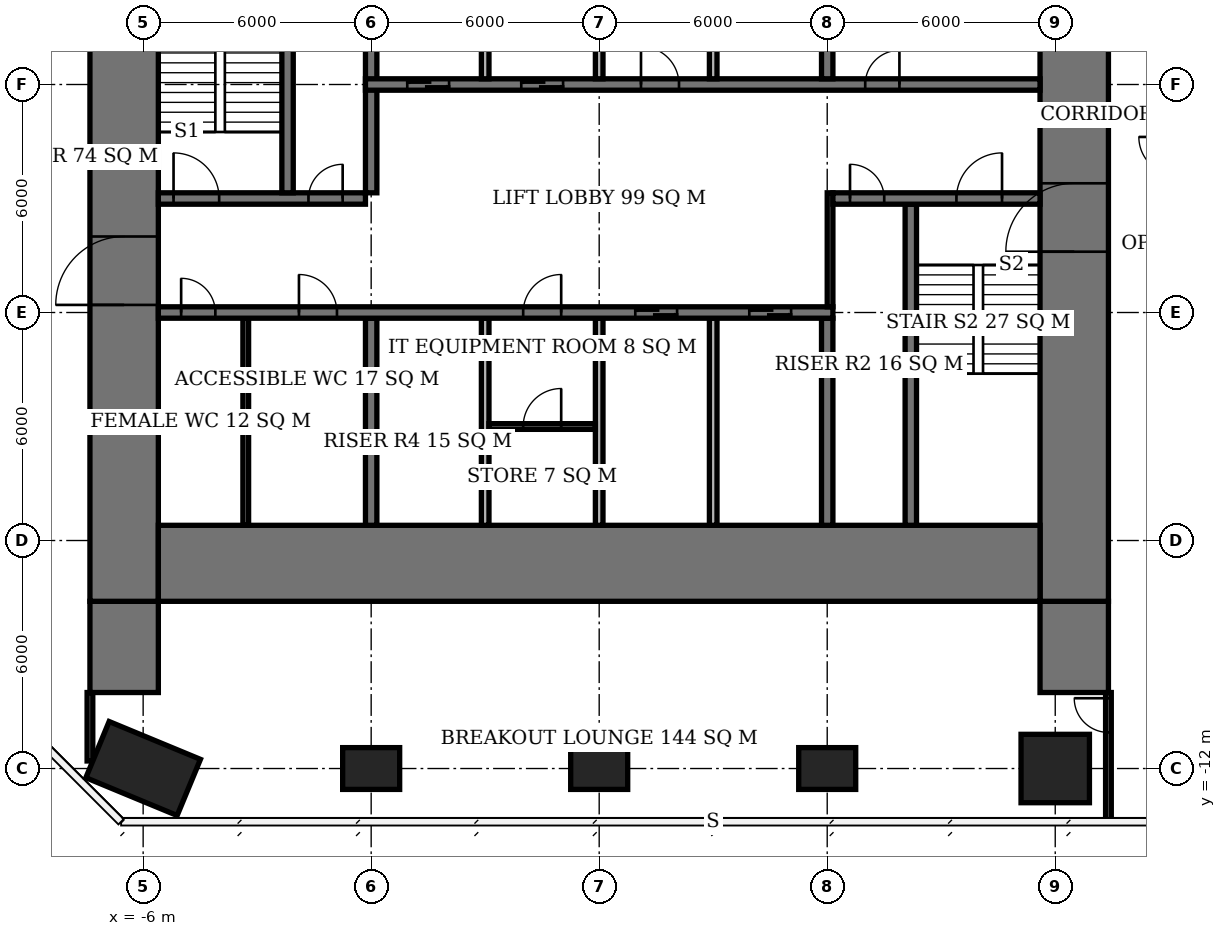
"""IFC4 building model, lengths in metres.
Left out: names, types, materials, properties, quantities, classifications, styles, units other than length and angle.
Written with IfcOpenShell. Run it as: python <this file> out.ifc"""

import sys

from ifc_helpers import new_model, si_unit, direction, frame, frame_2d, origin, origin_2d, place, context, subcontext, project, spatial, rectangle, extrude, element, fill, save


model = new_model("IFC4")
c1 = context("Model", 3, precision=1e-05, world=origin(), true_north=direction((0.0, 1.0)))
c2 = subcontext(c1, "Body", "Model", "MODEL_VIEW")
j1 = project(units=[si_unit("LENGTHUNIT", "METRE"), si_unit("PLANEANGLEUNIT", "RADIAN")], contexts=[c1])
p1 = place(None, origin())
s1 = spatial("IfcSite", under=j1, at=p1, CompositionType="ELEMENT")
p2 = place(p1, origin())
s2 = spatial("IfcBuilding", under=s1, at=p2, CompositionType="ELEMENT")
p3 = place(p2, frame((0.0, 0.0, 173.3)))
s3 = spatial("IfcBuildingStorey", under=s2, at=p3, CompositionType="ELEMENT", Elevation=173.3)
p4 = place(p3, frame((-6.0, -12.0, 0.0), z_axis=(0.0, 0.0, 1.0), x_axis=(-0.923879532511, 0.382683432365, 0.0)))
e1 = element("IfcColumn", 1, at=p4, inside=s3, PredefinedType="COLUMN", context=c2, shape_type="SweptSolid", body=[
    extrude(rectangle(XDim=2.6, YDim=1.6, at=origin_2d()), origin(), (0.0, 0.0, 1.0), 3.9),
])
for number, where, z_axis, x_axis in (
    (2, (0.0, -12.0, 0.0), (0.0, 0.0, 1.0), (1.0, 0.0, 0.0)),
    (3, (6.0, -12.0, 0.0), (0.0, 0.0, 1.0), (1.0, 0.0, 0.0)),
    (4, (12.0, -12.0, 0.0), (0.0, 0.0, 1.0), (1.0, 0.0, 0.0)),
):
    element("IfcColumn", number, at=place(p3, frame(where, z_axis=z_axis, x_axis=x_axis)), inside=s3, PredefinedType="COLUMN", context=c2, shape_type="SweptSolid", body=[
        extrude(rectangle(XDim=1.5, YDim=1.1, at=origin_2d()), origin(), (0.0, 0.0, 1.0), 3.9),
    ])
p5 = place(p3, frame((18.0, -12.0, 0.0), z_axis=(0.0, 0.0, 1.0), x_axis=(1.0, 0.0, 0.0)))
e5 = element("IfcColumn", 5, at=p5, inside=s3, PredefinedType="COLUMN", context=c2, shape_type="SweptSolid", body=[
    extrude(rectangle(XDim=1.8, YDim=1.8, at=origin_2d()), origin(), (0.0, 0.0, 1.0), 3.9),
])
p6 = place(p3, frame((-5.6, -6.6, 0.0), z_axis=(0.0, 0.0, 1.0), x_axis=(1.0, 0.0, 0.0)))
e6 = element("IfcWall", 6, at=p6, inside=s3, PredefinedType="SHEAR", context=c2, shape_type="SweptSolid", body=[
    extrude(rectangle(XDim=23.2, YDim=2.0, at=frame_2d((11.6, 0.0))), origin(), (0.0, 0.0, 1.0), 3.9),
])
p7 = place(p3, frame((-6.5, -7.6, 0.0), z_axis=(0.0, 0.0, 1.0), x_axis=(0.0, 1.0, 0.0)))
e7 = element("IfcWall", 7, at=p7, inside=s3, PredefinedType="SHEAR", context=c2, shape_type="SweptSolid", body=[
    extrude(rectangle(XDim=21.2, YDim=1.8, at=frame_2d((10.6, 0.0))), origin(), (0.0, 0.0, 1.0), 3.9),
])
p8 = place(p7, frame((7.8, 0.0, 0.0)))
e8 = element("IfcOpeningElement", 8, at=p8, cuts=e7, PredefinedType="OPENING", context=c2, shape_type="SweptSolid", body=[
    extrude(rectangle(XDim=1.8, YDim=2.4, at=frame_2d((0.9, 1.2))), frame((0.0, 0.91, 0.0), z_axis=(0.0, -1.0, 0.0), x_axis=(1.0, 0.0, 0.0)), (0.0, 0.0, 1.0), 1.82),
])
p9 = place(p3, frame((18.5, -7.6, 0.0), z_axis=(0.0, 0.0, 1.0), x_axis=(0.0, 1.0, 0.0)))
e9 = element("IfcWall", 9, at=p9, inside=s3, PredefinedType="SHEAR", context=c2, shape_type="SweptSolid", body=[
    extrude(rectangle(XDim=21.2, YDim=1.8, at=frame_2d((10.6, 0.0))), origin(), (0.0, 0.0, 1.0), 3.9),
])
p10 = place(p9, frame((9.2, 0.0, 0.0)))
e10 = element("IfcOpeningElement", 10, at=p10, cuts=e9, PredefinedType="OPENING", context=c2, shape_type="SweptSolid", body=[
    extrude(rectangle(XDim=1.8, YDim=2.4, at=frame_2d((0.9, 1.2))), frame((0.0, 0.91, 0.0), z_axis=(0.0, -1.0, 0.0), x_axis=(1.0, 0.0, 0.0)), (0.0, 0.0, 1.0), 1.82),
])
for number, where, z_axis, x_axis in (
    (11, (-6.5, -10.0, 0.0), (0.0, 0.0, 1.0), (0.0, 1.0, 0.0)),
    (12, (18.5, -10.0, 0.0), (0.0, 0.0, 1.0), (0.0, 1.0, 0.0)),
):
    element("IfcWall", number, at=place(p3, frame(where, z_axis=z_axis, x_axis=x_axis)), inside=s3, PredefinedType="SHEAR", context=c2, shape_type="SweptSolid", body=[
        extrude(rectangle(XDim=2.4, YDim=1.8, at=frame_2d((1.2, 0.0))), origin(), (0.0, 0.0, 1.0), 3.9),
    ])
p11 = place(p3, frame((-5.6, 0.0, 0.0), z_axis=(0.0, 0.0, 1.0), x_axis=(1.0, 0.0, 0.0)))
e13 = element("IfcWall", 13, at=p11, inside=s3, PredefinedType="SHEAR", context=c2, shape_type="SweptSolid", body=[
    extrude(rectangle(XDim=17.75, YDim=0.3, at=frame_2d((8.875, 0.0))), origin(), (0.0, 0.0, 1.0), 3.9),
])
p12 = place(p11, frame((0.6, 0.0, 0.0)))
e14 = element("IfcOpeningElement", 14, at=p12, cuts=e13, PredefinedType="OPENING", context=c2, shape_type="SweptSolid", body=[
    extrude(rectangle(XDim=0.9, YDim=2.1, at=frame_2d((0.45, 1.05))), frame((0.0, 0.16, 0.0), z_axis=(0.0, -1.0, 0.0), x_axis=(1.0, 0.0, 0.0)), (0.0, 0.0, 1.0), 0.32),
])
p13 = place(p11, frame((3.7, 0.0, 0.0)))
e15 = element("IfcOpeningElement", 15, at=p13, cuts=e13, PredefinedType="OPENING", context=c2, shape_type="SweptSolid", body=[
    extrude(rectangle(XDim=1.0, YDim=2.1, at=frame_2d((0.5, 1.05))), frame((0.0, 0.16, 0.0), z_axis=(0.0, -1.0, 0.0), x_axis=(1.0, 0.0, 0.0)), (0.0, 0.0, 1.0), 0.32),
])
p14 = place(p11, frame((9.6, 0.0, 0.0)))
e16 = element("IfcOpeningElement", 16, at=p14, cuts=e13, PredefinedType="OPENING", context=c2, shape_type="SweptSolid", body=[
    extrude(rectangle(XDim=1.0, YDim=2.1, at=frame_2d((0.5, 1.05))), frame((0.0, 0.16, 0.0), z_axis=(0.0, -1.0, 0.0), x_axis=(1.0, 0.0, 0.0)), (0.0, 0.0, 1.0), 0.32),
])
p15 = place(p11, frame((12.55, 0.0, 0.0)))
e17 = element("IfcOpeningElement", 17, at=p15, cuts=e13, PredefinedType="OPENING", context=c2, shape_type="SweptSolid", body=[
    extrude(rectangle(XDim=1.1, YDim=2.1, at=frame_2d((0.55, 1.05))), frame((0.0, 0.16, 0.0), z_axis=(0.0, -1.0, 0.0), x_axis=(1.0, 0.0, 0.0)), (0.0, 0.0, 1.0), 0.32),
])
p16 = place(p11, frame((15.55, 0.0, 0.0)))
e18 = element("IfcOpeningElement", 18, at=p16, cuts=e13, PredefinedType="OPENING", context=c2, shape_type="SweptSolid", body=[
    extrude(rectangle(XDim=1.1, YDim=2.1, at=frame_2d((0.55, 1.05))), frame((0.0, 0.16, 0.0), z_axis=(0.0, -1.0, 0.0), x_axis=(1.0, 0.0, 0.0)), (0.0, 0.0, 1.0), 0.32),
])
p17 = place(p3, frame((-5.6, 3.0, 0.0), z_axis=(0.0, 0.0, 1.0), x_axis=(1.0, 0.0, 0.0)))
e19 = element("IfcWall", 19, at=p17, inside=s3, PredefinedType="SHEAR", context=c2, shape_type="SweptSolid", body=[
    extrude(rectangle(XDim=5.45, YDim=0.3, at=frame_2d((2.725, 0.0))), origin(), (0.0, 0.0, 1.0), 3.9),
])
p18 = place(p17, frame((0.4, 0.0, 0.0)))
e20 = element("IfcOpeningElement", 20, at=p18, cuts=e19, PredefinedType="OPENING", context=c2, shape_type="SweptSolid", body=[
    extrude(rectangle(XDim=1.2, YDim=2.1, at=frame_2d((0.6, 1.05))), frame((0.0, 0.16, 0.0), z_axis=(0.0, -1.0, 0.0), x_axis=(1.0, 0.0, 0.0)), (0.0, 0.0, 1.0), 0.32),
])
p19 = place(p17, frame((3.95, 0.0, 0.0)))
e21 = element("IfcOpeningElement", 21, at=p19, cuts=e19, PredefinedType="OPENING", context=c2, shape_type="SweptSolid", body=[
    extrude(rectangle(XDim=0.9, YDim=2.1, at=frame_2d((0.45, 1.05))), frame((0.0, 0.16, 0.0), z_axis=(0.0, -1.0, 0.0), x_axis=(1.0, 0.0, 0.0)), (0.0, 0.0, 1.0), 0.32),
])
p20 = place(p3, frame((12.15, 3.0, 0.0), z_axis=(0.0, 0.0, 1.0), x_axis=(1.0, 0.0, 0.0)))
e22 = element("IfcWall", 22, at=p20, inside=s3, PredefinedType="SHEAR", context=c2, shape_type="SweptSolid", body=[
    extrude(rectangle(XDim=5.45, YDim=0.3, at=frame_2d((2.725, 0.0))), origin(), (0.0, 0.0, 1.0), 3.9),
])
p21 = place(p20, frame((3.25, 0.0, 0.0)))
e23 = element("IfcOpeningElement", 23, at=p21, cuts=e22, PredefinedType="OPENING", context=c2, shape_type="SweptSolid", body=[
    extrude(rectangle(XDim=1.2, YDim=2.1, at=frame_2d((0.6, 1.05))), frame((0.0, 0.16, 0.0), z_axis=(0.0, -1.0, 0.0), x_axis=(1.0, 0.0, 0.0)), (0.0, 0.0, 1.0), 0.32),
])
p22 = place(p20, frame((0.45, 0.0, 0.0)))
e24 = element("IfcOpeningElement", 24, at=p22, cuts=e22, PredefinedType="OPENING", context=c2, shape_type="SweptSolid", body=[
    extrude(rectangle(XDim=0.9, YDim=2.1, at=frame_2d((0.45, 1.05))), frame((0.0, 0.16, 0.0), z_axis=(0.0, -1.0, 0.0), x_axis=(1.0, 0.0, 0.0)), (0.0, 0.0, 1.0), 0.32),
])
p23 = place(p3, frame((-0.15, 6.0, 0.0), z_axis=(0.0, 0.0, 1.0), x_axis=(1.0, 0.0, 0.0)))
e25 = element("IfcWall", 25, at=p23, inside=s3, PredefinedType="SHEAR", context=c2, shape_type="SweptSolid", body=[
    extrude(rectangle(XDim=17.75, YDim=0.3, at=frame_2d((8.875, 0.0))), origin(), (0.0, 0.0, 1.0), 3.9),
])
p24 = place(p23, frame((13.15, 0.0, 0.0)))
e26 = element("IfcOpeningElement", 26, at=p24, cuts=e25, PredefinedType="OPENING", context=c2, shape_type="SweptSolid", body=[
    extrude(rectangle(XDim=0.9, YDim=2.1, at=frame_2d((0.45, 1.05))), frame((0.0, 0.16, 0.0), z_axis=(0.0, -1.0, 0.0), x_axis=(1.0, 0.0, 0.0)), (0.0, 0.0, 1.0), 0.32),
])
p25 = place(p23, frame((7.25, 0.0, 0.0)))
e27 = element("IfcOpeningElement", 27, at=p25, cuts=e25, PredefinedType="OPENING", context=c2, shape_type="SweptSolid", body=[
    extrude(rectangle(XDim=1.0, YDim=2.1, at=frame_2d((0.5, 1.05))), frame((0.0, 0.16, 0.0), z_axis=(0.0, -1.0, 0.0), x_axis=(1.0, 0.0, 0.0)), (0.0, 0.0, 1.0), 0.32),
])
p26 = place(p23, frame((1.1, 0.0, 0.0)))
e28 = element("IfcOpeningElement", 28, at=p26, cuts=e25, PredefinedType="OPENING", context=c2, shape_type="SweptSolid", body=[
    extrude(rectangle(XDim=1.1, YDim=2.1, at=frame_2d((0.55, 1.05))), frame((0.0, 0.16, 0.0), z_axis=(0.0, -1.0, 0.0), x_axis=(1.0, 0.0, 0.0)), (0.0, 0.0, 1.0), 0.32),
])
p27 = place(p23, frame((4.1, 0.0, 0.0)))
e29 = element("IfcOpeningElement", 29, at=p27, cuts=e25, PredefinedType="OPENING", context=c2, shape_type="SweptSolid", body=[
    extrude(rectangle(XDim=1.1, YDim=2.1, at=frame_2d((0.55, 1.05))), frame((0.0, 0.16, 0.0), z_axis=(0.0, -1.0, 0.0), x_axis=(1.0, 0.0, 0.0)), (0.0, 0.0, 1.0), 0.32),
])
p28 = place(p3, frame((0.0, -5.6, 0.0), z_axis=(0.0, 0.0, 1.0), x_axis=(0.0, 1.0, 0.0)))
e30 = element("IfcWall", 30, at=p28, inside=s3, PredefinedType="SHEAR", context=c2, shape_type="SweptSolid", body=[
    extrude(rectangle(XDim=5.45, YDim=0.3, at=frame_2d((2.725, 0.0))), origin(), (0.0, 0.0, 1.0), 3.9),
])
p29 = place(p3, frame((0.0, 3.15, 0.0), z_axis=(0.0, 0.0, 1.0), x_axis=(0.0, 1.0, 0.0)))
e31 = element("IfcWall", 31, at=p29, inside=s3, PredefinedType="SHEAR", context=c2, shape_type="SweptSolid", body=[
    extrude(rectangle(XDim=8.45, YDim=0.3, at=frame_2d((4.225, 0.0))), origin(), (0.0, 0.0, 1.0), 3.9),
])
for number, where, z_axis, x_axis in (
    (32, (12.0, -5.6, 0.0), (0.0, 0.0, 1.0), (0.0, 1.0, 0.0)),
    (33, (12.0, 6.15, 0.0), (0.0, 0.0, 1.0), (0.0, 1.0, 0.0)),
):
    element("IfcWall", number, at=place(p3, frame(where, z_axis=z_axis, x_axis=x_axis)), inside=s3, PredefinedType="SHEAR", context=c2, shape_type="SweptSolid", body=[
        extrude(rectangle(XDim=5.45, YDim=0.3, at=frame_2d((2.725, 0.0))), origin(), (0.0, 0.0, 1.0), 3.9),
    ])
for number, where, z_axis, x_axis in (
    (34, (-2.2, 3.15, 0.0), (0.0, 0.0, 1.0), (0.0, 1.0, 0.0)),
    (35, (14.2, -5.6, 0.0), (0.0, 0.0, 1.0), (0.0, 1.0, 0.0)),
):
    element("IfcWall", number, at=place(p3, frame(where, z_axis=z_axis, x_axis=x_axis)), inside=s3, PredefinedType="SHEAR", context=c2, shape_type="SweptSolid", body=[
        extrude(rectangle(XDim=8.45, YDim=0.3, at=frame_2d((4.225, 0.0))), origin(), (0.0, 0.0, 1.0), 3.9),
    ])
for number, where, z_axis, x_axis in (
    (36, (3.0, 6.15, 0.0), (0.0, 0.0, 1.0), (0.0, 1.0, 0.0)),
    (37, (6.0, 6.15, 0.0), (0.0, 0.0, 1.0), (0.0, 1.0, 0.0)),
    (38, (9.0, 6.15, 0.0), (0.0, 0.0, 1.0), (0.0, 1.0, 0.0)),
    (39, (3.0, -5.6, 0.0), (0.0, 0.0, 1.0), (0.0, 1.0, 0.0)),
    (40, (6.0, -5.6, 0.0), (0.0, 0.0, 1.0), (0.0, 1.0, 0.0)),
    (41, (9.0, -5.6, 0.0), (0.0, 0.0, 1.0), (0.0, 1.0, 0.0)),
):
    element("IfcWall", number, at=place(p3, frame(where, z_axis=z_axis, x_axis=x_axis)), inside=s3, PredefinedType="SOLIDWALL", context=c2, shape_type="SweptSolid", body=[
        extrude(rectangle(XDim=5.45, YDim=0.2, at=frame_2d((2.725, 0.0))), origin(), (0.0, 0.0, 1.0), 3.9),
    ])
p30 = place(p3, frame((-3.3, -5.6, 0.0), z_axis=(0.0, 0.0, 1.0), x_axis=(0.0, 1.0, 0.0)))
e42 = element("IfcWall", 42, at=p30, inside=s3, PredefinedType="PLUMBINGWALL", context=c2, shape_type="SweptSolid", body=[
    extrude(rectangle(XDim=5.45, YDim=0.15, at=frame_2d((2.725, 0.0))), origin(), (0.0, 0.0, 1.0), 3.65),
])
p31 = place(p3, frame((3.1, -3.0, 0.0), z_axis=(0.0, 0.0, 1.0), x_axis=(1.0, 0.0, 0.0)))
e43 = element("IfcWall", 43, at=p31, inside=s3, PredefinedType="PARTITIONING", context=c2, shape_type="SweptSolid", body=[
    extrude(rectangle(XDim=2.8, YDim=0.15, at=frame_2d((1.4, 0.0))), origin(), (0.0, 0.0, 1.0), 3.65),
])
p32 = place(p31, frame((0.9, 0.0, 0.0)))
e44 = element("IfcOpeningElement", 44, at=p32, cuts=e43, PredefinedType="OPENING", context=c2, shape_type="SweptSolid", body=[
    extrude(rectangle(XDim=1.0, YDim=2.1, at=frame_2d((0.5, 1.05))), frame((0.0, 0.085, 0.0), z_axis=(0.0, -1.0, 0.0), x_axis=(1.0, 0.0, 0.0)), (0.0, 0.0, 1.0), 0.17),
])
p33 = place(p3, frame((-7.4, -11.802, 0.0), z_axis=(0.0, 0.0, 1.0), x_axis=(0.0, 1.0, 0.0)))
e45 = element("IfcWall", 45, at=p33, inside=s3, PredefinedType="PARTITIONING", context=c2, shape_type="SweptSolid", body=[
    extrude(rectangle(XDim=1.802, YDim=0.15, at=frame_2d((0.901, 0.0))), origin(), (0.0, 0.0, 1.0), 3.65),
])
p34 = place(p3, frame((19.4, -13.4, 0.0), z_axis=(0.0, 0.0, 1.0), x_axis=(0.0, 1.0, 0.0)))
e46 = element("IfcWall", 46, at=p34, inside=s3, PredefinedType="PARTITIONING", context=c2, shape_type="SweptSolid", body=[
    extrude(rectangle(XDim=3.4, YDim=0.15, at=frame_2d((1.7, 0.0))), origin(), (0.0, 0.0, 1.0), 3.65),
])
p35 = place(p34, frame((2.35, 0.0, 0.0)))
e47 = element("IfcOpeningElement", 47, at=p35, cuts=e46, PredefinedType="OPENING", context=c2, shape_type="SweptSolid", body=[
    extrude(rectangle(XDim=0.9, YDim=2.1, at=frame_2d((0.45, 1.05))), frame((0.0, 0.085, 0.0), z_axis=(0.0, -1.0, 0.0), x_axis=(1.0, 0.0, 0.0)), (0.0, 0.0, 1.0), 0.17),
])
p36 = place(p3, frame((12.075, 0.15, 0.0), z_axis=(0.0, 0.0, 1.0), x_axis=(0.0, 1.0, 0.0)))
e48 = element("IfcWall", 48, at=p36, inside=s3, PredefinedType="PARTITIONING", context=c2, shape_type="SweptSolid", body=[
    extrude(rectangle(XDim=3.0, YDim=0.15, at=frame_2d((1.5, 0.0))), origin(), (0.0, 0.0, 1.0), 3.65),
])
p37 = place(p8, origin())
e49 = element("IfcDoor", 49, at=p37, inside=s3, OperationType="DOUBLE_DOOR_SINGLE_SWING", PredefinedType="DOOR", context=c2, shape_type="SweptSolid", body=[
    extrude(rectangle(XDim=1.8, YDim=2.4, at=frame_2d((0.9, 1.2))), frame((0.0, 0.025, 0.0), z_axis=(0.0, -1.0, 0.0), x_axis=(1.0, 0.0, 0.0)), (0.0, 0.0, 1.0), 0.05),
])
fill(e8, e49)
p38 = place(p10, origin())
e50 = element("IfcDoor", 50, at=p38, inside=s3, OperationType="DOUBLE_DOOR_SINGLE_SWING", PredefinedType="DOOR", context=c2, shape_type="SweptSolid", body=[
    extrude(rectangle(XDim=1.8, YDim=2.4, at=frame_2d((0.9, 1.2))), frame((0.0, 0.025, 0.0), z_axis=(0.0, -1.0, 0.0), x_axis=(1.0, 0.0, 0.0)), (0.0, 0.0, 1.0), 0.05),
])
fill(e10, e50)
p39 = place(p18, origin())
e51 = element("IfcDoor", 51, at=p39, inside=s3, OperationType="SINGLE_SWING_LEFT", PredefinedType="DOOR", context=c2, shape_type="SweptSolid", body=[
    extrude(rectangle(XDim=1.2, YDim=2.1, at=frame_2d((0.6, 1.05))), frame((0.0, 0.025, 0.0), z_axis=(0.0, -1.0, 0.0), x_axis=(1.0, 0.0, 0.0)), (0.0, 0.0, 1.0), 0.05),
])
fill(e20, e51)
p40 = place(p19, origin())
e52 = element("IfcDoor", 52, at=p40, inside=s3, OperationType="SINGLE_SWING_RIGHT", PredefinedType="DOOR", context=c2, shape_type="SweptSolid", body=[
    extrude(rectangle(XDim=0.9, YDim=2.1, at=frame_2d((0.45, 1.05))), frame((0.0, 0.025, 0.0), z_axis=(0.0, -1.0, 0.0), x_axis=(1.0, 0.0, 0.0)), (0.0, 0.0, 1.0), 0.05),
])
fill(e21, e52)
p41 = place(p21, origin())
e53 = element("IfcDoor", 53, at=p41, inside=s3, OperationType="SINGLE_SWING_RIGHT", PredefinedType="DOOR", context=c2, shape_type="SweptSolid", body=[
    extrude(rectangle(XDim=1.2, YDim=2.1, at=frame_2d((0.6, 1.05))), frame((0.0, 0.025, 0.0), z_axis=(0.0, -1.0, 0.0), x_axis=(1.0, 0.0, 0.0)), (0.0, 0.0, 1.0), 0.05),
])
fill(e23, e53)
p42 = place(p22, origin())
e54 = element("IfcDoor", 54, at=p42, inside=s3, OperationType="SINGLE_SWING_LEFT", PredefinedType="DOOR", context=c2, shape_type="SweptSolid", body=[
    extrude(rectangle(XDim=0.9, YDim=2.1, at=frame_2d((0.45, 1.05))), frame((0.0, 0.025, 0.0), z_axis=(0.0, -1.0, 0.0), x_axis=(1.0, 0.0, 0.0)), (0.0, 0.0, 1.0), 0.05),
])
fill(e24, e54)
p43 = place(p12, origin())
e55 = element("IfcDoor", 55, at=p43, inside=s3, OperationType="SINGLE_SWING_LEFT", PredefinedType="DOOR", context=c2, shape_type="SweptSolid", body=[
    extrude(rectangle(XDim=0.9, YDim=2.1, at=frame_2d((0.45, 1.05))), frame((0.0, 0.025, 0.0), z_axis=(0.0, -1.0, 0.0), x_axis=(1.0, 0.0, 0.0)), (0.0, 0.0, 1.0), 0.05),
])
fill(e14, e55)
p44 = place(p13, origin())
e56 = element("IfcDoor", 56, at=p44, inside=s3, OperationType="SINGLE_SWING_LEFT", PredefinedType="DOOR", context=c2, shape_type="SweptSolid", body=[
    extrude(rectangle(XDim=1.0, YDim=2.1, at=frame_2d((0.5, 1.05))), frame((0.0, 0.025, 0.0), z_axis=(0.0, -1.0, 0.0), x_axis=(1.0, 0.0, 0.0)), (0.0, 0.0, 1.0), 0.05),
])
fill(e15, e56)
p45 = place(p24, origin())
e57 = element("IfcDoor", 57, at=p45, inside=s3, OperationType="SINGLE_SWING_RIGHT", PredefinedType="DOOR", context=c2, shape_type="SweptSolid", body=[
    extrude(rectangle(XDim=0.9, YDim=2.1, at=frame_2d((0.45, 1.05))), frame((0.0, 0.025, 0.0), z_axis=(0.0, -1.0, 0.0), x_axis=(1.0, 0.0, 0.0)), (0.0, 0.0, 1.0), 0.05),
])
fill(e26, e57)
p46 = place(p25, origin())
e58 = element("IfcDoor", 58, at=p46, inside=s3, OperationType="SINGLE_SWING_LEFT", PredefinedType="DOOR", context=c2, shape_type="SweptSolid", body=[
    extrude(rectangle(XDim=1.0, YDim=2.1, at=frame_2d((0.5, 1.05))), frame((0.0, 0.025, 0.0), z_axis=(0.0, -1.0, 0.0), x_axis=(1.0, 0.0, 0.0)), (0.0, 0.0, 1.0), 0.05),
])
fill(e27, e58)
p47 = place(p32, origin())
e59 = element("IfcDoor", 59, at=p47, inside=s3, OperationType="SINGLE_SWING_RIGHT", PredefinedType="DOOR", context=c2, shape_type="SweptSolid", body=[
    extrude(rectangle(XDim=1.0, YDim=2.1, at=frame_2d((0.5, 1.05))), frame((0.0, 0.025, 0.0), z_axis=(0.0, -1.0, 0.0), x_axis=(1.0, 0.0, 0.0)), (0.0, 0.0, 1.0), 0.05),
])
fill(e44, e59)
p48 = place(p14, origin())
e60 = element("IfcDoor", 60, at=p48, inside=s3, OperationType="SINGLE_SWING_RIGHT", PredefinedType="DOOR", context=c2, shape_type="SweptSolid", body=[
    extrude(rectangle(XDim=1.0, YDim=2.1, at=frame_2d((0.5, 1.05))), frame((0.0, 0.025, 0.0), z_axis=(0.0, -1.0, 0.0), x_axis=(1.0, 0.0, 0.0)), (0.0, 0.0, 1.0), 0.05),
])
fill(e16, e60)
p49 = place(p26, origin())
e61 = element("IfcDoor", 61, at=p49, inside=s3, OperationType="DOUBLE_DOOR_SLIDING", PredefinedType="USERDEFINED", context=c2, shape_type="SweptSolid", body=[
    extrude(rectangle(XDim=1.1, YDim=2.1, at=frame_2d((0.55, 1.05))), frame((0.0, 0.025, 0.0), z_axis=(0.0, -1.0, 0.0), x_axis=(1.0, 0.0, 0.0)), (0.0, 0.0, 1.0), 0.05),
])
fill(e28, e61)
p50 = place(p27, origin())
e62 = element("IfcDoor", 62, at=p50, inside=s3, OperationType="DOUBLE_DOOR_SLIDING", PredefinedType="USERDEFINED", context=c2, shape_type="SweptSolid", body=[
    extrude(rectangle(XDim=1.1, YDim=2.1, at=frame_2d((0.55, 1.05))), frame((0.0, 0.025, 0.0), z_axis=(0.0, -1.0, 0.0), x_axis=(1.0, 0.0, 0.0)), (0.0, 0.0, 1.0), 0.05),
])
fill(e29, e62)
p51 = place(p15, origin())
e63 = element("IfcDoor", 63, at=p51, inside=s3, OperationType="DOUBLE_DOOR_SLIDING", PredefinedType="USERDEFINED", context=c2, shape_type="SweptSolid", body=[
    extrude(rectangle(XDim=1.1, YDim=2.1, at=frame_2d((0.55, 1.05))), frame((0.0, 0.025, 0.0), z_axis=(0.0, -1.0, 0.0), x_axis=(1.0, 0.0, 0.0)), (0.0, 0.0, 1.0), 0.05),
])
fill(e17, e63)
p52 = place(p16, origin())
e64 = element("IfcDoor", 64, at=p52, inside=s3, OperationType="DOUBLE_DOOR_SLIDING", PredefinedType="USERDEFINED", context=c2, shape_type="SweptSolid", body=[
    extrude(rectangle(XDim=1.1, YDim=2.1, at=frame_2d((0.55, 1.05))), frame((0.0, 0.025, 0.0), z_axis=(0.0, -1.0, 0.0), x_axis=(1.0, 0.0, 0.0)), (0.0, 0.0, 1.0), 0.05),
])
fill(e18, e64)
p53 = place(p35, origin())
e65 = element("IfcDoor", 65, at=p53, inside=s3, OperationType="SINGLE_SWING_RIGHT", PredefinedType="DOOR", context=c2, shape_type="SweptSolid", body=[
    extrude(rectangle(XDim=0.9, YDim=2.1, at=frame_2d((0.45, 1.05))), frame((0.0, 0.025, 0.0), z_axis=(0.0, -1.0, 0.0), x_axis=(1.0, 0.0, 0.0)), (0.0, 0.0, 1.0), 0.05),
])
fill(e47, e65)
save(model, sys.argv[1])
